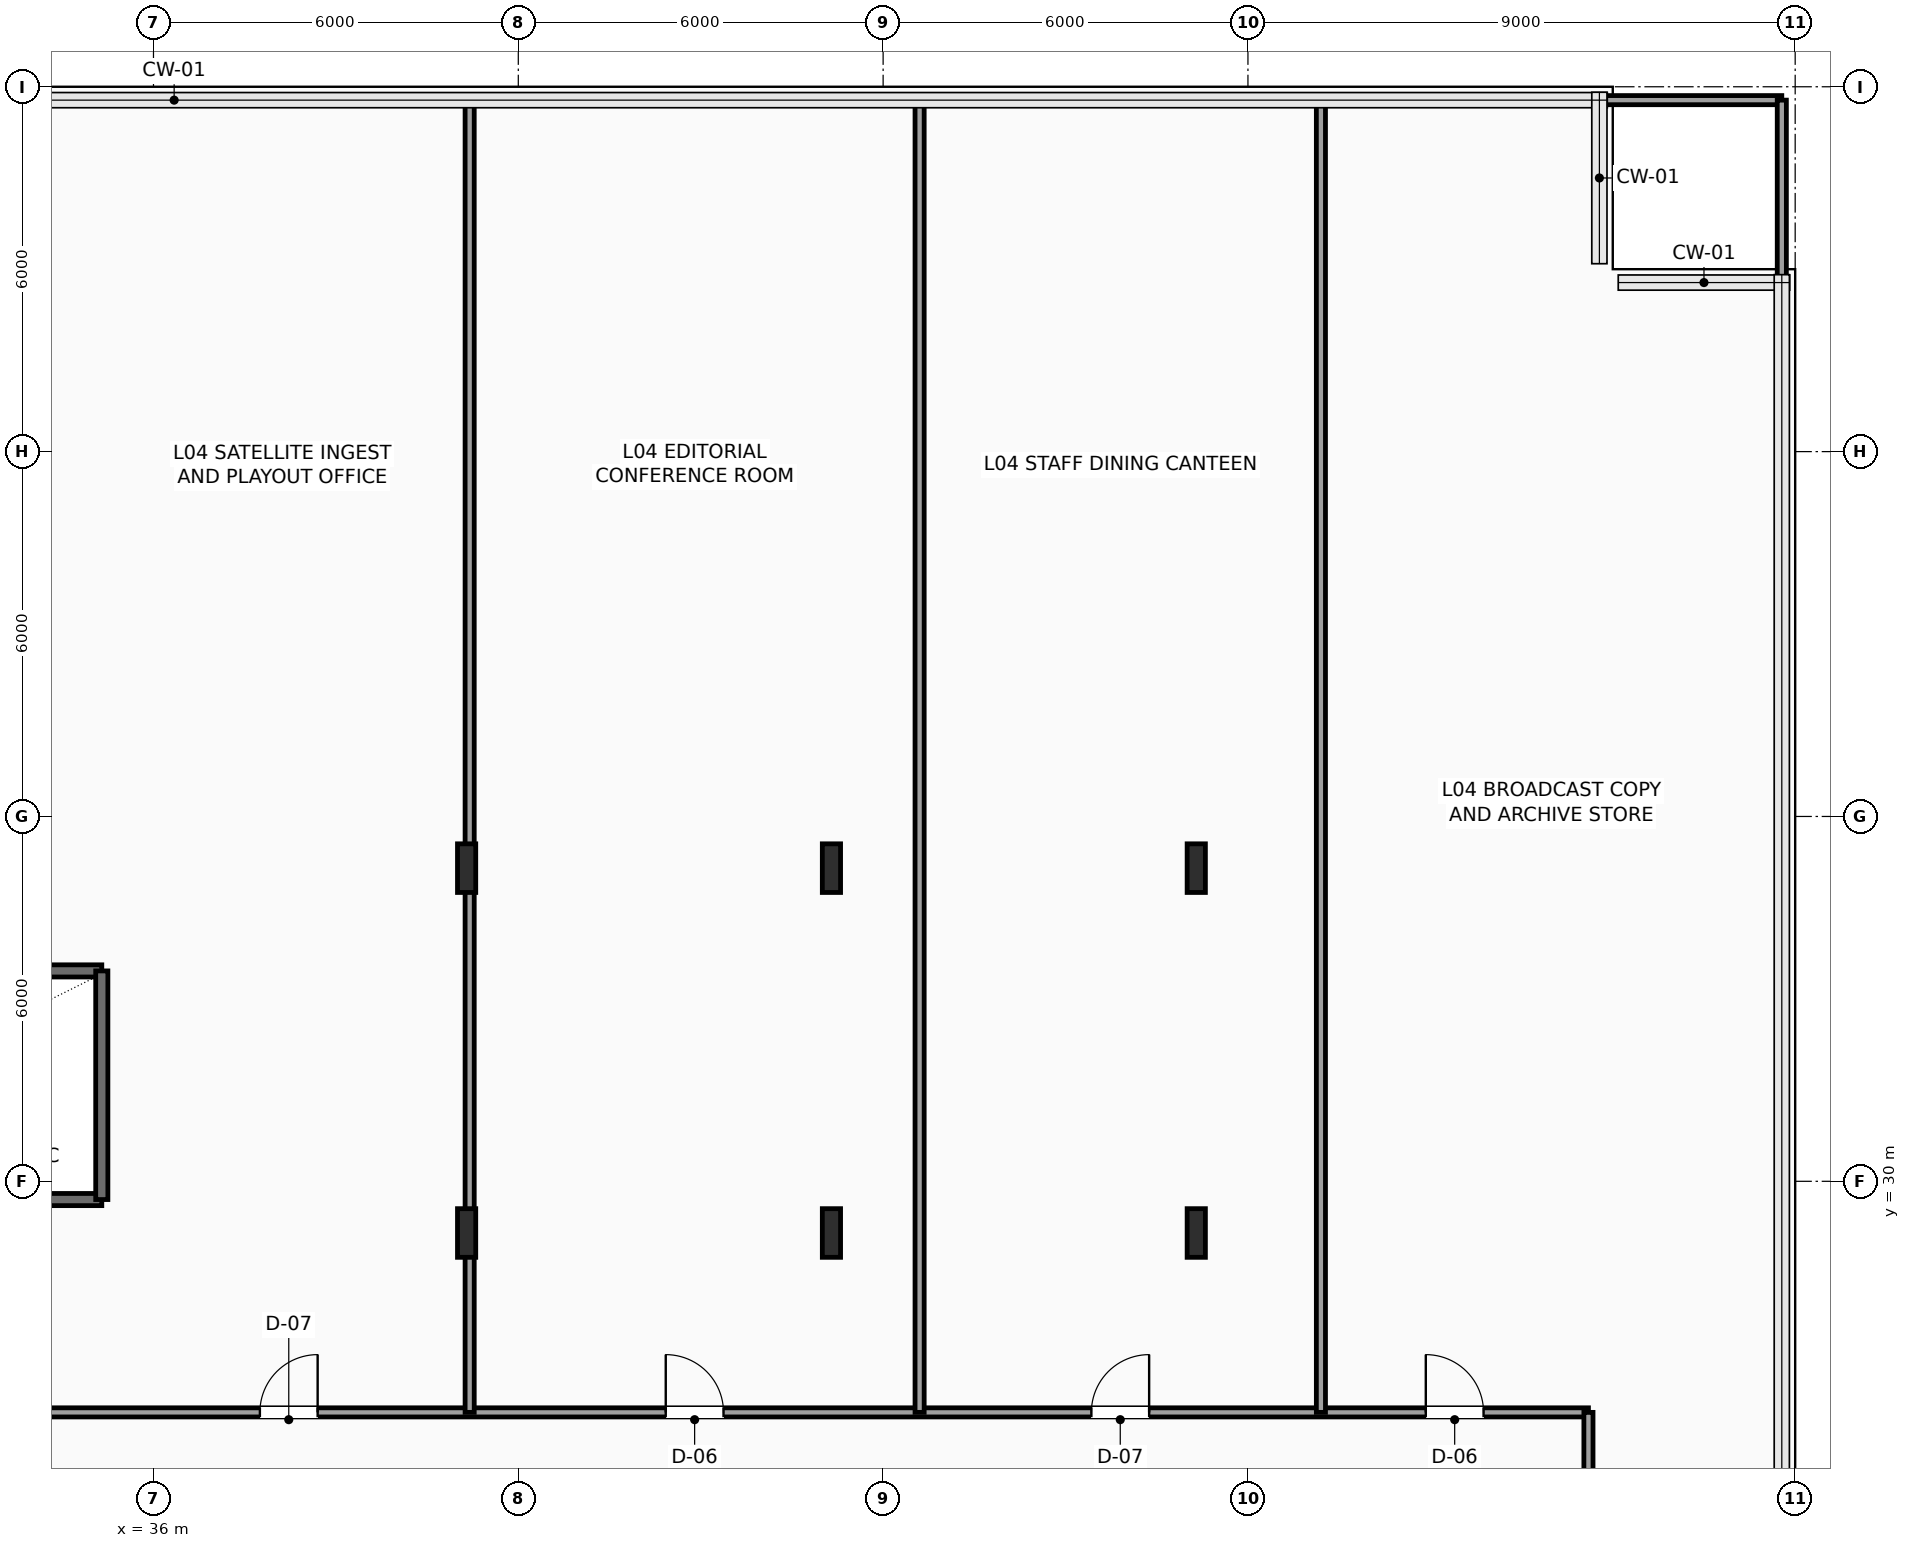
"""IFC4 building model, lengths in metres.
Left out: names, types, materials, properties, quantities, classifications, styles, units other than length and angle.
Written with IfcOpenShell. Run it as: python <this file> out.ifc"""

import sys

from ifc_helpers import new_model, si_unit, direction, frame, frame_2d, origin, origin_2d, place, context, subcontext, project, spatial, rectangle, i_section, extrude, element, fill, save


model = new_model("IFC4")
c1 = context("Model", 3, precision=1e-05, world=origin(), true_north=direction((0.0, 1.0)))
c2 = subcontext(c1, "Body", "Model", "MODEL_VIEW")
j1 = project(units=[si_unit("LENGTHUNIT", "METRE"), si_unit("PLANEANGLEUNIT", "RADIAN")], contexts=[c1])
p1 = place(None, origin())
s1 = spatial("IfcSite", under=j1, at=p1, CompositionType="ELEMENT")
p2 = place(p1, origin())
s2 = spatial("IfcBuilding", under=s1, at=p2, CompositionType="ELEMENT")
p3 = place(p2, frame((0.0, 0.0, 21.9)))
s3 = spatial("IfcBuildingStorey", under=s2, at=p3, CompositionType="ELEMENT", Elevation=21.9)
for number, where, z_axis, x_axis in (
    (1, (41.15, 29.15, 0.0), (0.0, 0.0, 1.0), (1.0, 0.0, 0.0)),
    (2, (41.15, 35.15, 0.0), (0.0, 0.0, 1.0), (1.0, 0.0, 0.0)),
    (3, (47.15, 29.15, 0.0), (0.0, 0.0, 1.0), (1.0, 0.0, 0.0)),
    (4, (47.15, 35.15, 0.0), (0.0, 0.0, 1.0), (1.0, 0.0, 0.0)),
    (5, (53.15, 29.15, 0.0), (0.0, 0.0, 1.0), (1.0, 0.0, 0.0)),
    (6, (53.15, 35.15, 0.0), (0.0, 0.0, 1.0), (1.0, 0.0, 0.0)),
):
    element("IfcColumn", number, at=place(p3, frame(where, z_axis=z_axis, x_axis=x_axis)), inside=s3, PredefinedType="COLUMN", context=c2, shape_type="SweptSolid", body=[
        extrude(i_section(OverallWidth=0.3, OverallDepth=0.8, WebThickness=0.018, FlangeThickness=0.033, FilletRadius=0.03, at=origin_2d()), origin(), (0.0, 0.0, 1.0), 5.35),
    ])
p4 = place(p3, frame((26.1, 29.7, 0.0), z_axis=(0.0, 0.0, 1.0), x_axis=(1.0, 0.0, 0.0)))
e7 = element("IfcWall", 7, at=p4, inside=s3, PredefinedType="SHEAR", context=c2, shape_type="SweptSolid", body=[
    extrude(rectangle(XDim=9.05, YDim=0.2, at=frame_2d((4.525, 0.0))), origin(), (0.0, 0.0, 1.0), 5.35),
])
p5 = place(p4, frame((0.35, 0.0, 0.0)))
e8 = element("IfcOpeningElement", 8, at=p5, cuts=e7, PredefinedType="OPENING", context=c2, shape_type="SweptSolid", body=[
    extrude(rectangle(XDim=1.1, YDim=2.2, at=frame_2d((0.55, 1.1))), frame((0.0, 0.11, 0.0), z_axis=(0.0, -1.0, 0.0), x_axis=(1.0, 0.0, 0.0)), (0.0, 0.0, 1.0), 0.22),
])
p6 = place(p3, frame((26.1, 33.46, 0.0), z_axis=(0.0, 0.0, 1.0), x_axis=(1.0, 0.0, 0.0)))
e9 = element("IfcWall", 9, at=p6, inside=s3, PredefinedType="SHEAR", context=c2, shape_type="SweptSolid", body=[
    extrude(rectangle(XDim=9.05, YDim=0.2, at=frame_2d((4.525, 0.0))), origin(), (0.0, 0.0, 1.0), 5.35),
])
p7 = place(p3, frame((35.15, 29.7, 0.0), z_axis=(0.0, 0.0, 1.0), x_axis=(0.0, 1.0, 0.0)))
e10 = element("IfcWall", 10, at=p7, inside=s3, PredefinedType="SHEAR", context=c2, shape_type="SweptSolid", body=[
    extrude(rectangle(XDim=3.76, YDim=0.2, at=frame_2d((1.88, 0.0))), origin(), (0.0, 0.0, 1.0), 5.35),
])
p8 = place(p3, frame((26.05, 26.2, 0.0), z_axis=(0.0, 0.0, 1.0), x_axis=(1.0, 0.0, 0.0)))
e11 = element("IfcWall", 11, at=p8, inside=s3, PredefinedType="PARTITIONING", context=c2, shape_type="SweptSolid", body=[
    extrude(rectangle(XDim=33.55, YDim=0.15, at=frame_2d((16.775, 0.0))), origin(), (0.0, 0.0, 1.0), 5.35),
])
p9 = place(p8, frame((2.45, 0.0, 0.0)))
e12 = element("IfcOpeningElement", 12, at=p9, cuts=e11, PredefinedType="OPENING", context=c2, shape_type="SweptSolid", body=[
    extrude(rectangle(XDim=0.9, YDim=2.1, at=frame_2d((0.45, 1.05))), frame((0.0, 0.085, 0.0), z_axis=(0.0, -1.0, 0.0), x_axis=(1.0, 0.0, 0.0)), (0.0, 0.0, 1.0), 0.17),
])
p10 = place(p8, frame((11.7, 0.0, 0.0)))
e13 = element("IfcOpeningElement", 13, at=p10, cuts=e11, PredefinedType="OPENING", context=c2, shape_type="SweptSolid", body=[
    extrude(rectangle(XDim=0.95, YDim=2.15, at=frame_2d((0.475, 1.075))), frame((0.0, 0.085, 0.0), z_axis=(0.0, -1.0, 0.0), x_axis=(1.0, 0.0, 0.0)), (0.0, 0.0, 1.0), 0.17),
])
p11 = place(p8, frame((18.375, 0.0, 0.0)))
e14 = element("IfcOpeningElement", 14, at=p11, cuts=e11, PredefinedType="OPENING", context=c2, shape_type="SweptSolid", body=[
    extrude(rectangle(XDim=0.95, YDim=2.15, at=frame_2d((0.475, 1.075))), frame((0.0, 0.085, 0.0), z_axis=(0.0, -1.0, 0.0), x_axis=(1.0, 0.0, 0.0)), (0.0, 0.0, 1.0), 0.17),
])
p12 = place(p8, frame((25.375, 0.0, 0.0)))
e15 = element("IfcOpeningElement", 15, at=p12, cuts=e11, PredefinedType="OPENING", context=c2, shape_type="SweptSolid", body=[
    extrude(rectangle(XDim=0.95, YDim=2.15, at=frame_2d((0.475, 1.075))), frame((0.0, 0.085, 0.0), z_axis=(0.0, -1.0, 0.0), x_axis=(1.0, 0.0, 0.0)), (0.0, 0.0, 1.0), 0.17),
])
p13 = place(p8, frame((30.875, 0.0, 0.0)))
e16 = element("IfcOpeningElement", 16, at=p13, cuts=e11, PredefinedType="OPENING", context=c2, shape_type="SweptSolid", body=[
    extrude(rectangle(XDim=0.95, YDim=2.15, at=frame_2d((0.475, 1.075))), frame((0.0, 0.085, 0.0), z_axis=(0.0, -1.0, 0.0), x_axis=(1.0, 0.0, 0.0)), (0.0, 0.0, 1.0), 0.17),
])
p14 = place(p3, frame((59.6, 26.2, 0.0), z_axis=(0.0, 0.0, 1.0), x_axis=(0.0, -1.0, 0.0)))
e17 = element("IfcWall", 17, at=p14, inside=s3, PredefinedType="PARTITIONING", context=c2, shape_type="SweptSolid", body=[
    extrude(rectangle(XDim=2.56, YDim=0.15, at=frame_2d((1.28, 0.0))), origin(), (0.0, 0.0, 1.0), 5.35),
])
p15 = place(p3, frame((41.2, 26.2, 0.0), z_axis=(0.0, 0.0, 1.0), x_axis=(0.0, 1.0, 0.0)))
e18 = element("IfcWall", 18, at=p15, inside=s3, PredefinedType="PARTITIONING", context=c2, shape_type="SweptSolid", body=[
    extrude(rectangle(XDim=21.58, YDim=0.15, at=frame_2d((10.79, 0.0))), origin(), (0.0, 0.0, 1.0), 4.692),
])
for number, where, z_axis, x_axis in (
    (19, (48.6, 26.2, 0.0), (0.0, 0.0, 1.0), (0.0, 1.0, 0.0)),
    (20, (55.2, 26.2, 0.0), (0.0, 0.0, 1.0), (0.0, 1.0, 0.0)),
):
    element("IfcWall", number, at=place(p3, frame(where, z_axis=z_axis, x_axis=x_axis)), inside=s3, PredefinedType="PARTITIONING", context=c2, shape_type="SweptSolid", body=[
        extrude(rectangle(XDim=21.58, YDim=0.15, at=frame_2d((10.79, 0.0))), origin(), (0.0, 0.0, 1.0), 5.35),
    ])
p16 = place(p3, frame((55.2, 47.78, 0.0), z_axis=(0.0, 0.0, 1.0), x_axis=(1.0, 0.0, 0.0)))
e21 = element("IfcWall", 21, at=p16, inside=s3, PredefinedType="PARTITIONING", context=c2, shape_type="SweptSolid", body=[
    extrude(rectangle(XDim=7.58, YDim=0.15, at=frame_2d((3.79, 0.0))), origin(), (0.0, 0.0, 1.0), 5.35),
])
p17 = place(p3, frame((62.78, 26.2, 0.0), z_axis=(0.0, 0.0, 1.0), x_axis=(0.0, 1.0, 0.0)))
e22 = element("IfcWall", 22, at=p17, inside=s3, PredefinedType="PARTITIONING", context=c2, shape_type="SweptSolid", body=[
    extrude(rectangle(XDim=21.58, YDim=0.15, at=frame_2d((10.79, 0.0))), origin(), (0.0, 0.0, 1.0), 5.35),
])
p18 = place(p10, origin())
e23 = element("IfcDoor", 23, at=p18, inside=s3, OperationType="SINGLE_SWING_RIGHT", PredefinedType="DOOR", context=c2, shape_type="SweptSolid", body=[
    extrude(rectangle(XDim=0.95, YDim=2.15, at=frame_2d((0.475, 1.075))), frame((0.0, 0.025, 0.0), z_axis=(0.0, -1.0, 0.0), x_axis=(1.0, 0.0, 0.0)), (0.0, 0.0, 1.0), 0.05),
])
fill(e13, e23)
p19 = place(p11, origin())
e24 = element("IfcDoor", 24, at=p19, inside=s3, OperationType="SINGLE_SWING_LEFT", PredefinedType="DOOR", context=c2, shape_type="SweptSolid", body=[
    extrude(rectangle(XDim=0.95, YDim=2.15, at=frame_2d((0.475, 1.075))), frame((0.0, 0.025, 0.0), z_axis=(0.0, -1.0, 0.0), x_axis=(1.0, 0.0, 0.0)), (0.0, 0.0, 1.0), 0.05),
])
fill(e14, e24)
p20 = place(p12, origin())
e25 = element("IfcDoor", 25, at=p20, inside=s3, OperationType="SINGLE_SWING_RIGHT", PredefinedType="DOOR", context=c2, shape_type="SweptSolid", body=[
    extrude(rectangle(XDim=0.95, YDim=2.15, at=frame_2d((0.475, 1.075))), frame((0.0, 0.025, 0.0), z_axis=(0.0, -1.0, 0.0), x_axis=(1.0, 0.0, 0.0)), (0.0, 0.0, 1.0), 0.05),
])
fill(e15, e25)
p21 = place(p13, origin())
e26 = element("IfcDoor", 26, at=p21, inside=s3, OperationType="SINGLE_SWING_LEFT", PredefinedType="DOOR", context=c2, shape_type="SweptSolid", body=[
    extrude(rectangle(XDim=0.95, YDim=2.15, at=frame_2d((0.475, 1.075))), frame((0.0, 0.025, 0.0), z_axis=(0.0, -1.0, 0.0), x_axis=(1.0, 0.0, 0.0)), (0.0, 0.0, 1.0), 0.05),
])
fill(e16, e26)
save(model, sys.argv[1])
